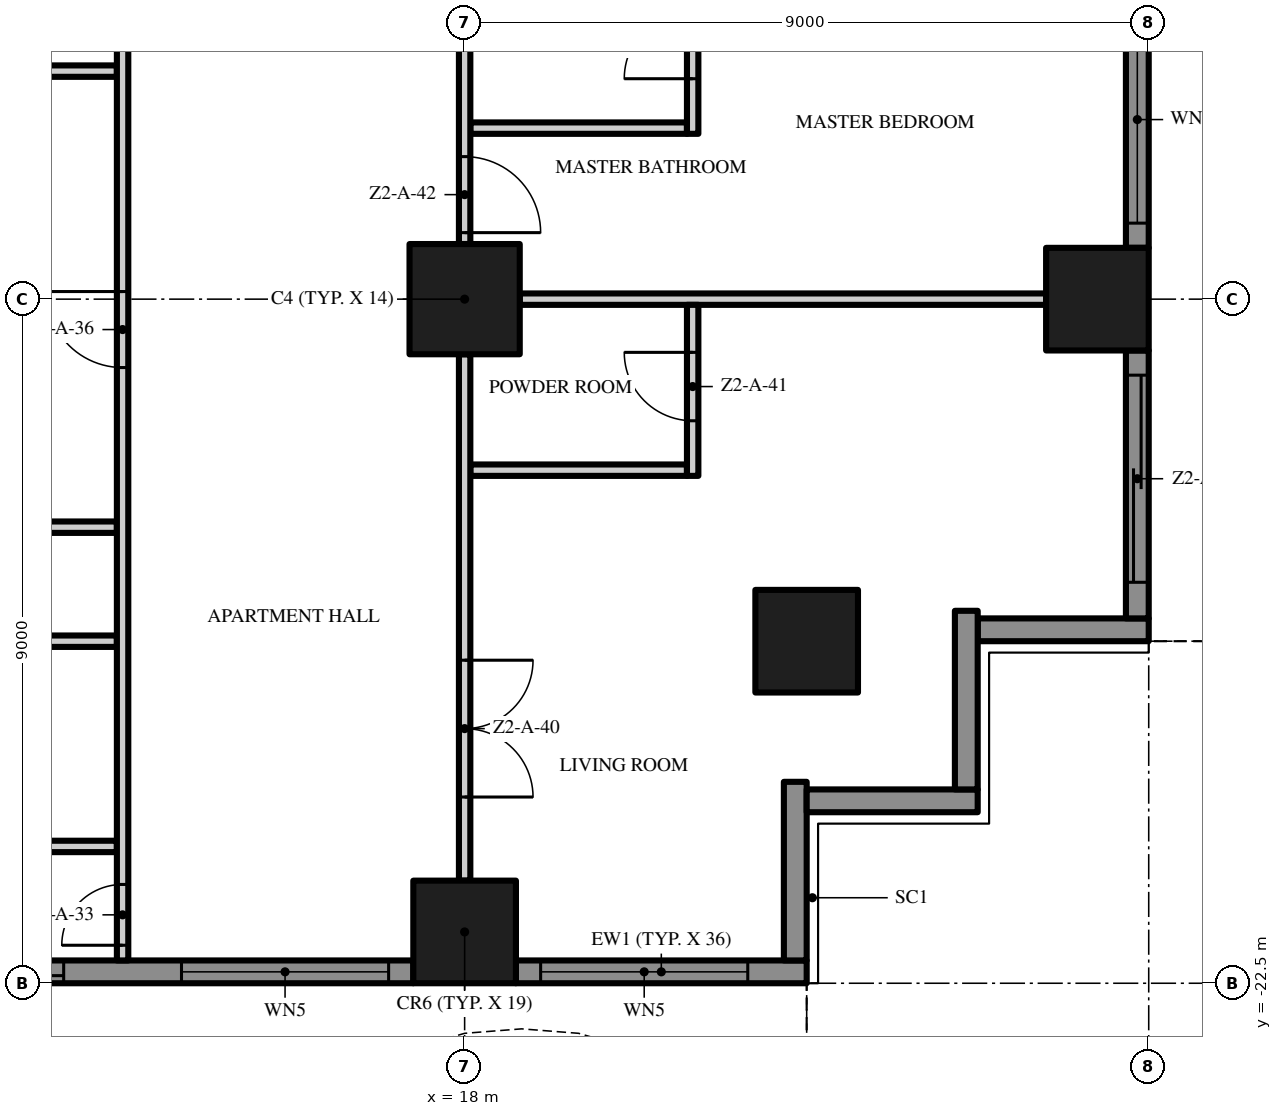
"""IFC4 building model, lengths in metres.
Left out: names, types, materials, properties, quantities, classifications, styles, units other than length and angle.
Written with IfcOpenShell. Run it as: python <this file> out.ifc"""

import sys

from ifc_helpers import new_model, si_unit, direction, frame, frame_2d, origin, origin_2d, place, context, subcontext, project, spatial, polyline, rectangle, outline, extrude, element, fill, save


model = new_model("IFC4")
c1 = context("Model", 3, precision=1e-05, world=origin(), true_north=direction((0.0, 1.0)))
c2 = subcontext(c1, "Body", "Model", "MODEL_VIEW")
j1 = project(units=[si_unit("LENGTHUNIT", "METRE"), si_unit("PLANEANGLEUNIT", "RADIAN")], contexts=[c1])
p1 = place(None, origin())
s1 = spatial("IfcSite", under=j1, at=p1, CompositionType="ELEMENT")
p2 = place(p1, origin())
s2 = spatial("IfcBuilding", under=s1, at=p2, CompositionType="ELEMENT")
p3 = place(p2, frame((0.0, 0.0, 77.0)))
s3 = spatial("IfcBuildingStorey", under=s2, at=p3, CompositionType="ELEMENT", Elevation=77.0)
p4 = place(p3, frame((18.0, -13.5, 0.0), z_axis=(0.0, 0.0, 1.0), x_axis=(1.0, 0.0, 0.0)))
e1 = element("IfcColumn", 1, at=p4, inside=s3, PredefinedType="COLUMN", context=c2, shape_type="SweptSolid", body=[
    extrude(rectangle(XDim=1.45, YDim=1.45, at=origin_2d()), origin(), (0.0, 0.0, 1.0), 3.5),
])
for number, where, z_axis, x_axis in (
    (2, (18.0, -21.825, 0.0), (0.0, 0.0, 1.0), (1.0, 0.0, 0.0)),
    (3, (26.325, -13.5, 0.0), (0.0, 0.0, 1.0), (1.0, 0.0, 0.0)),
    (4, (22.5, -18.0, 0.0), (0.0, 0.0, 1.0), (1.0, 0.0, 0.0)),
):
    element("IfcColumn", number, at=place(p3, frame(where, z_axis=z_axis, x_axis=x_axis)), inside=s3, PredefinedType="COLUMN", context=c2, shape_type="SweptSolid", body=[
        extrude(rectangle(XDim=1.35, YDim=1.35, at=origin_2d()), origin(), (0.0, 0.0, 1.0), 3.5),
    ])
p5 = place(p3, frame((17.325, -22.35, 0.0), z_axis=(0.0, 0.0, 1.0), x_axis=(-1.0, 0.0, 0.0)))
e5 = element("IfcWall", 5, at=p5, inside=s3, PredefinedType="SOLIDWALL", context=c2, shape_type="SweptSolid", body=[
    extrude(rectangle(XDim=7.65, YDim=0.3, at=frame_2d((3.825, 0.0))), origin(), (0.0, 0.0, 1.0), 3.5),
])
p6 = place(p5, frame((4.6, 0.0, 0.0)))
e6 = element("IfcOpeningElement", 6, at=p6, cuts=e5, PredefinedType="OPENING", context=c2, shape_type="SweptSolid", body=[
    extrude(rectangle(XDim=2.725, YDim=2.4, at=frame_2d((1.363, 1.2))), frame((0.0, 0.16, 0.0), z_axis=(0.0, -1.0, 0.0), x_axis=(1.0, 0.0, 0.0)), (0.0, 0.0, 1.0), 0.32),
])
p7 = place(p5, frame((0.325, 0.0, 0.45)))
e7 = element("IfcOpeningElement", 7, at=p7, cuts=e5, PredefinedType="OPENING", context=c2, shape_type="SweptSolid", body=[
    extrude(rectangle(XDim=2.725, YDim=2.65, at=frame_2d((1.363, 1.325))), frame((0.0, 0.16, 0.0), z_axis=(0.0, -1.0, 0.0), x_axis=(1.0, 0.0, 0.0)), (0.0, 0.0, 1.0), 0.32),
])
p8 = place(p3, frame((22.5, -22.35, 0.0), z_axis=(0.0, 0.0, 1.0), x_axis=(-1.0, 0.0, 0.0)))
e8 = element("IfcWall", 8, at=p8, inside=s3, PredefinedType="SOLIDWALL", context=c2, shape_type="SweptSolid", body=[
    extrude(rectangle(XDim=3.825, YDim=0.3, at=frame_2d((1.913, 0.0))), origin(), (0.0, 0.0, 1.0), 3.5),
])
p9 = place(p8, frame((0.775, 0.0, 0.45)))
e9 = element("IfcOpeningElement", 9, at=p9, cuts=e8, PredefinedType="OPENING", context=c2, shape_type="SweptSolid", body=[
    extrude(rectangle(XDim=2.725, YDim=2.65, at=frame_2d((1.363, 1.325))), frame((0.0, 0.16, 0.0), z_axis=(0.0, -1.0, 0.0), x_axis=(1.0, 0.0, 0.0)), (0.0, 0.0, 1.0), 0.32),
])
p10 = place(p3, frame((22.35, -19.85, 0.0), z_axis=(0.0, 0.0, 1.0), x_axis=(0.0, -1.0, 0.0)))
e10 = element("IfcWall", 10, at=p10, inside=s3, PredefinedType="SOLIDWALL", context=c2, shape_type="SweptSolid", body=[
    extrude(rectangle(XDim=2.35, YDim=0.3, at=frame_2d((1.175, 0.0))), origin(), (0.0, 0.0, 1.0), 3.5),
])
p11 = place(p3, frame((24.75, -20.1, 0.0), z_axis=(0.0, 0.0, 1.0), x_axis=(-1.0, 0.0, 0.0)))
e11 = element("IfcWall", 11, at=p11, inside=s3, PredefinedType="SOLIDWALL", context=c2, shape_type="SweptSolid", body=[
    extrude(rectangle(XDim=2.25, YDim=0.3, at=frame_2d((1.125, 0.0))), origin(), (0.0, 0.0, 1.0), 3.5),
])
p12 = place(p3, frame((24.6, -17.6, 0.0), z_axis=(0.0, 0.0, 1.0), x_axis=(0.0, -1.0, 0.0)))
e12 = element("IfcWall", 12, at=p12, inside=s3, PredefinedType="SOLIDWALL", context=c2, shape_type="SweptSolid", body=[
    extrude(rectangle(XDim=2.35, YDim=0.3, at=frame_2d((1.175, 0.0))), origin(), (0.0, 0.0, 1.0), 3.5),
])
p13 = place(p3, frame((27.0, -17.85, 0.0), z_axis=(0.0, 0.0, 1.0), x_axis=(-1.0, 0.0, 0.0)))
e13 = element("IfcWall", 13, at=p13, inside=s3, PredefinedType="SOLIDWALL", context=c2, shape_type="SweptSolid", body=[
    extrude(rectangle(XDim=2.25, YDim=0.3, at=frame_2d((1.125, 0.0))), origin(), (0.0, 0.0, 1.0), 3.5),
])
p14 = place(p3, frame((26.85, -14.175, 0.0), z_axis=(0.0, 0.0, 1.0), x_axis=(0.0, -1.0, 0.0)))
e14 = element("IfcWall", 14, at=p14, inside=s3, PredefinedType="SOLIDWALL", context=c2, shape_type="SweptSolid", body=[
    extrude(rectangle(XDim=3.525, YDim=0.3, at=frame_2d((1.762, 0.0))), origin(), (0.0, 0.0, 1.0), 3.5),
])
p15 = place(p14, frame((0.325, 0.0, 0.0)))
e15 = element("IfcOpeningElement", 15, at=p15, cuts=e14, PredefinedType="OPENING", context=c2, shape_type="SweptSolid", body=[
    extrude(rectangle(XDim=2.725, YDim=2.4, at=frame_2d((1.363, 1.2))), frame((0.0, 0.16, 0.0), z_axis=(0.0, -1.0, 0.0), x_axis=(1.0, 0.0, 0.0)), (0.0, 0.0, 1.0), 0.32),
])
p16 = place(p3, frame((26.85, -5.175, 0.0), z_axis=(0.0, 0.0, 1.0), x_axis=(0.0, -1.0, 0.0)))
e16 = element("IfcWall", 16, at=p16, inside=s3, PredefinedType="SOLIDWALL", context=c2, shape_type="SweptSolid", body=[
    extrude(rectangle(XDim=7.65, YDim=0.3, at=frame_2d((3.825, 0.0))), origin(), (0.0, 0.0, 1.0), 3.5),
])
p17 = place(p16, frame((4.6, 0.0, 0.45)))
e17 = element("IfcOpeningElement", 17, at=p17, cuts=e16, PredefinedType="OPENING", context=c2, shape_type="SweptSolid", body=[
    extrude(rectangle(XDim=2.725, YDim=2.65, at=frame_2d((1.363, 1.325))), frame((0.0, 0.16, 0.0), z_axis=(0.0, -1.0, 0.0), x_axis=(1.0, 0.0, 0.0)), (0.0, 0.0, 1.0), 0.32),
])
p18 = place(p16, frame((0.325, 0.0, 0.45)))
e18 = element("IfcOpeningElement", 18, at=p18, cuts=e16, PredefinedType="OPENING", context=c2, shape_type="SweptSolid", body=[
    extrude(rectangle(XDim=2.725, YDim=2.65, at=frame_2d((1.363, 1.325))), frame((0.0, 0.16, 0.0), z_axis=(0.0, -1.0, 0.0), x_axis=(1.0, 0.0, 0.0)), (0.0, 0.0, 1.0), 0.32),
])
p19 = place(p3, origin())
e19 = element("IfcWall", 19, at=p19, inside=s3, PredefinedType="USERDEFINED", context=c2, shape_type="SweptSolid", body=[
    extrude(outline(polyline([(-22.5, -24.3), (-21.0, -25.005), (-19.5, -25.441), (-18.75, -25.5), (-18.0, -25.441), (-16.5, -25.005), (-15.0, -24.3), (-13.5, -23.595), (-12.0, -23.159), (-11.25, -23.1), (-10.5, -23.159), (-9.0, -23.595), (-7.5, -24.3), (-6.0, -25.005), (-4.5, -25.441), (-3.75, -25.5), (-3.0, -25.441), (-1.5, -25.005), (0.0, -24.3), (1.5, -23.595), (3.0, -23.159), (3.75, -23.1), (4.5, -23.159), (6.0, -23.595), (7.5, -24.3), (9.0, -25.005), (10.5, -25.441), (11.25, -25.5), (12.0, -25.441), (13.5, -25.005), (15.0, -24.3), (16.5, -23.595), (18.0, -23.159), (18.75, -23.1), (19.5, -23.159), (21.0, -23.595), (22.5, -24.3), (22.606, -24.074), (21.089, -23.36), (19.545, -22.911), (18.75, -22.849), (17.955, -22.911), (16.411, -23.36), (14.894, -24.074), (13.411, -24.771), (11.955, -25.194), (11.25, -25.249), (10.545, -25.194), (9.089, -24.771), (7.606, -24.074), (6.089, -23.36), (4.545, -22.911), (3.75, -22.849), (2.955, -22.911), (1.411, -23.36), (-0.106, -24.074), (-1.589, -24.771), (-3.045, -25.194), (-3.75, -25.249), (-4.455, -25.194), (-5.911, -24.771), (-7.394, -24.074), (-8.911, -23.36), (-10.455, -22.911), (-11.25, -22.849), (-12.045, -22.911), (-13.589, -23.36), (-15.106, -24.074), (-16.589, -24.771), (-18.045, -25.194), (-18.75, -25.249), (-19.455, -25.194), (-20.911, -24.771), (-22.394, -24.074), (-22.5, -24.3)])), origin(), (0.0, 0.0, 1.0), 0.9),
])
p20 = place(p3, origin())
e20 = element("IfcWall", 20, at=p20, inside=s3, PredefinedType="USERDEFINED", context=c2, shape_type="SweptSolid", body=[
    extrude(outline(polyline([(28.8, -18.0), (29.505, -16.5), (29.941, -15.0), (30.0, -14.25), (29.941, -13.5), (29.505, -12.0), (28.8, -10.5), (28.095, -9.0), (27.659, -7.5), (27.6, -6.75), (27.659, -6.0), (28.095, -4.5), (28.8, -3.0), (29.505, -1.5), (29.941, 0.0), (30.0, 0.75), (29.941, 1.5), (29.505, 3.0), (28.8, 4.5), (28.095, 6.0), (27.659, 7.5), (27.6, 8.25), (27.659, 9.0), (28.095, 10.5), (28.8, 12.0), (29.505, 13.5), (29.941, 15.0), (30.0, 15.75), (29.941, 16.5), (29.505, 18.0), (29.265, 17.93), (29.694, 16.455), (29.749, 15.75), (29.694, 15.045), (29.271, 13.589), (28.574, 12.106), (27.86, 10.589), (27.411, 9.045), (27.349, 8.25), (27.411, 7.455), (27.86, 5.911), (28.574, 4.394), (29.271, 2.911), (29.694, 1.455), (29.749, 0.75), (29.694, 0.045), (29.271, -1.411), (28.574, -2.894), (27.86, -4.411), (27.411, -5.955), (27.349, -6.75), (27.411, -7.545), (27.86, -9.089), (28.574, -10.606), (29.271, -12.089), (29.694, -13.545), (29.749, -14.25), (29.694, -14.955), (29.271, -16.411), (28.574, -17.894), (28.8, -18.0)])), origin(), (0.0, 0.0, 1.0), 0.9),
])
for number, where, z_axis, x_axis in (
    (21, (9.075, -20.7, 0.0), (0.0, 0.0, 1.0), (1.0, 0.0, 0.0)),
    (22, (9.075, -18.0, 0.0), (0.0, 0.0, 1.0), (1.0, 0.0, 0.0)),
    (23, (9.075, -16.5, 0.0), (0.0, 0.0, 1.0), (1.0, 0.0, 0.0)),
):
    element("IfcWall", number, at=place(p3, frame(where, z_axis=z_axis, x_axis=x_axis)), inside=s3, PredefinedType="PARTITIONING", context=c2, shape_type="SweptSolid", body=[
        extrude(rectangle(XDim=4.35, YDim=0.15, at=frame_2d((2.175, 0.0))), origin(), (0.0, 0.0, 1.0), 3.5),
    ])
p21 = place(p3, frame((18.075, -15.75, 0.0), z_axis=(0.0, 0.0, 1.0), x_axis=(1.0, 0.0, 0.0)))
e24 = element("IfcWall", 24, at=p21, inside=s3, PredefinedType="PARTITIONING", context=c2, shape_type="SweptSolid", body=[
    extrude(rectangle(XDim=2.85, YDim=0.15, at=frame_2d((1.425, 0.0))), origin(), (0.0, 0.0, 1.0), 3.5),
])
p22 = place(p3, frame((18.725, -13.5, 0.0), z_axis=(0.0, 0.0, 1.0), x_axis=(1.0, 0.0, 0.0)))
e25 = element("IfcWall", 25, at=p22, inside=s3, PredefinedType="PARTITIONING", context=c2, shape_type="SweptSolid", body=[
    extrude(rectangle(XDim=6.925, YDim=0.15, at=frame_2d((3.462, 0.0))), origin(), (0.0, 0.0, 1.0), 3.5),
])
p23 = place(p3, frame((18.075, -11.25, 0.0), z_axis=(0.0, 0.0, 1.0), x_axis=(1.0, 0.0, 0.0)))
e26 = element("IfcWall", 26, at=p23, inside=s3, PredefinedType="PARTITIONING", context=c2, shape_type="SweptSolid", body=[
    extrude(rectangle(XDim=2.85, YDim=0.15, at=frame_2d((1.425, 0.0))), origin(), (0.0, 0.0, 1.0), 3.5),
])
p24 = place(p3, frame((9.075, -10.5, 0.0), z_axis=(0.0, 0.0, 1.0), x_axis=(1.0, 0.0, 0.0)))
e27 = element("IfcWall", 27, at=p24, inside=s3, PredefinedType="PARTITIONING", context=c2, shape_type="SweptSolid", body=[
    extrude(rectangle(XDim=4.35, YDim=0.15, at=frame_2d((2.175, 0.0))), origin(), (0.0, 0.0, 1.0), 3.5),
])
p25 = place(p3, frame((13.5, -22.2, 0.0), z_axis=(0.0, 0.0, 1.0), x_axis=(0.0, 1.0, 0.0)))
e28 = element("IfcWall", 28, at=p25, inside=s3, PredefinedType="PARTITIONING", context=c2, shape_type="SweptSolid", body=[
    extrude(rectangle(XDim=14.025, YDim=0.15, at=frame_2d((7.013, 0.0))), origin(), (0.0, 0.0, 1.0), 3.5),
])
p26 = place(p25, frame((0.2, 0.0, 0.0)))
e29 = element("IfcOpeningElement", 29, at=p26, cuts=e28, PredefinedType="OPENING", context=c2, shape_type="SweptSolid", body=[
    extrude(rectangle(XDim=0.8, YDim=2.0, at=frame_2d((0.4, 1.0))), frame((0.0, 0.085, 0.0), z_axis=(0.0, -1.0, 0.0), x_axis=(1.0, 0.0, 0.0)), (0.0, 0.0, 1.0), 0.17),
])
p27 = place(p25, frame((7.8, 0.0, 0.0)))
e30 = element("IfcOpeningElement", 30, at=p27, cuts=e28, PredefinedType="OPENING", context=c2, shape_type="SweptSolid", body=[
    extrude(rectangle(XDim=1.0, YDim=2.4, at=frame_2d((0.5, 1.2))), frame((0.0, 0.085, 0.0), z_axis=(0.0, -1.0, 0.0), x_axis=(1.0, 0.0, 0.0)), (0.0, 0.0, 1.0), 0.17),
])
p28 = place(p3, frame((18.0, -14.225, 0.0), z_axis=(0.0, 0.0, 1.0), x_axis=(0.0, -1.0, 0.0)))
e31 = element("IfcWall", 31, at=p28, inside=s3, PredefinedType="PARTITIONING", context=c2, shape_type="SweptSolid", body=[
    extrude(rectangle(XDim=6.925, YDim=0.15, at=frame_2d((3.462, 0.0))), origin(), (0.0, 0.0, 1.0), 3.5),
])
p29 = place(p28, frame((4.025, 0.0, 0.0)))
e32 = element("IfcOpeningElement", 32, at=p29, cuts=e31, PredefinedType="OPENING", context=c2, shape_type="SweptSolid", body=[
    extrude(rectangle(XDim=1.8, YDim=2.4, at=frame_2d((0.9, 1.2))), frame((0.0, 0.085, 0.0), z_axis=(0.0, -1.0, 0.0), x_axis=(1.0, 0.0, 0.0)), (0.0, 0.0, 1.0), 0.17),
])
p30 = place(p3, frame((18.0, -5.225, 0.0), z_axis=(0.0, 0.0, 1.0), x_axis=(0.0, -1.0, 0.0)))
e33 = element("IfcWall", 33, at=p30, inside=s3, PredefinedType="PARTITIONING", context=c2, shape_type="SweptSolid", body=[
    extrude(rectangle(XDim=7.55, YDim=0.15, at=frame_2d((3.775, 0.0))), origin(), (0.0, 0.0, 1.0), 3.5),
])
p31 = place(p30, frame((6.4, 0.0, 0.0)))
e34 = element("IfcOpeningElement", 34, at=p31, cuts=e33, PredefinedType="OPENING", context=c2, shape_type="SweptSolid", body=[
    extrude(rectangle(XDim=1.0, YDim=2.4, at=frame_2d((0.5, 1.2))), frame((0.0, 0.085, 0.0), z_axis=(0.0, -1.0, 0.0), x_axis=(1.0, 0.0, 0.0)), (0.0, 0.0, 1.0), 0.17),
])
p32 = place(p30, frame((0.15, 0.0, 0.0)))
e35 = element("IfcOpeningElement", 35, at=p32, cuts=e33, PredefinedType="OPENING", context=c2, shape_type="SweptSolid", body=[
    extrude(rectangle(XDim=1.0, YDim=2.4, at=frame_2d((0.5, 1.2))), frame((0.0, 0.085, 0.0), z_axis=(0.0, -1.0, 0.0), x_axis=(1.0, 0.0, 0.0)), (0.0, 0.0, 1.0), 0.17),
])
p33 = place(p3, frame((21.0, -15.825, 0.0), z_axis=(0.0, 0.0, 1.0), x_axis=(0.0, 1.0, 0.0)))
e36 = element("IfcWall", 36, at=p33, inside=s3, PredefinedType="PARTITIONING", context=c2, shape_type="SweptSolid", body=[
    extrude(rectangle(XDim=2.25, YDim=0.15, at=frame_2d((1.125, 0.0))), origin(), (0.0, 0.0, 1.0), 3.5),
])
p34 = place(p33, frame((0.725, 0.0, 0.0)))
e37 = element("IfcOpeningElement", 37, at=p34, cuts=e36, PredefinedType="OPENING", context=c2, shape_type="SweptSolid", body=[
    extrude(rectangle(XDim=0.9, YDim=2.1, at=frame_2d((0.45, 1.05))), frame((0.0, 0.085, 0.0), z_axis=(0.0, -1.0, 0.0), x_axis=(1.0, 0.0, 0.0)), (0.0, 0.0, 1.0), 0.17),
])
p35 = place(p3, frame((21.0, -11.325, 0.0), z_axis=(0.0, 0.0, 1.0), x_axis=(0.0, 1.0, 0.0)))
e38 = element("IfcWall", 38, at=p35, inside=s3, PredefinedType="PARTITIONING", context=c2, shape_type="SweptSolid", body=[
    extrude(rectangle(XDim=4.65, YDim=0.15, at=frame_2d((2.325, 0.0))), origin(), (0.0, 0.0, 1.0), 3.5),
])
p36 = place(p35, frame((0.725, 0.0, 0.0)))
e39 = element("IfcOpeningElement", 39, at=p36, cuts=e38, PredefinedType="OPENING", context=c2, shape_type="SweptSolid", body=[
    extrude(rectangle(XDim=0.9, YDim=2.1, at=frame_2d((0.45, 1.05))), frame((0.0, 0.085, 0.0), z_axis=(0.0, -1.0, 0.0), x_axis=(1.0, 0.0, 0.0)), (0.0, 0.0, 1.0), 0.17),
])
p37 = place(p35, frame((3.025, 0.0, 0.0)))
e40 = element("IfcOpeningElement", 40, at=p37, cuts=e38, PredefinedType="OPENING", context=c2, shape_type="SweptSolid", body=[
    extrude(rectangle(XDim=0.9, YDim=2.1, at=frame_2d((0.45, 1.05))), frame((0.0, 0.085, 0.0), z_axis=(0.0, -1.0, 0.0), x_axis=(1.0, 0.0, 0.0)), (0.0, 0.0, 1.0), 0.17),
])
p38 = place(p6, origin())
e41 = element("IfcDoor", 41, at=p38, inside=s3, OperationType="SINGLE_SWING_LEFT", PredefinedType="DOOR", context=c2, shape_type="SweptSolid", body=[
    extrude(rectangle(XDim=2.725, YDim=2.4, at=frame_2d((1.363, 1.2))), frame((0.0, 0.025, 0.0), z_axis=(0.0, -1.0, 0.0), x_axis=(1.0, 0.0, 0.0)), (0.0, 0.0, 1.0), 0.05),
])
fill(e6, e41)
p39 = place(p7, origin())
e42 = element("IfcWindow", 42, at=p39, inside=s3, PartitioningType="SINGLE_PANEL", PredefinedType="WINDOW", context=c2, shape_type="SweptSolid", body=[
    extrude(rectangle(XDim=2.725, YDim=2.65, at=frame_2d((1.363, 1.325))), frame((0.0, 0.03, 0.0), z_axis=(0.0, -1.0, 0.0), x_axis=(1.0, 0.0, 0.0)), (0.0, 0.0, 1.0), 0.06),
])
fill(e7, e42)
p40 = place(p9, origin())
e43 = element("IfcWindow", 43, at=p40, inside=s3, PartitioningType="SINGLE_PANEL", PredefinedType="WINDOW", context=c2, shape_type="SweptSolid", body=[
    extrude(rectangle(XDim=2.725, YDim=2.65, at=frame_2d((1.363, 1.325))), frame((0.0, 0.03, 0.0), z_axis=(0.0, -1.0, 0.0), x_axis=(1.0, 0.0, 0.0)), (0.0, 0.0, 1.0), 0.06),
])
fill(e9, e43)
p41 = place(p15, origin())
e44 = element("IfcDoor", 44, at=p41, inside=s3, OperationType="SINGLE_SWING_LEFT", PredefinedType="DOOR", context=c2, shape_type="SweptSolid", body=[
    extrude(rectangle(XDim=2.725, YDim=2.4, at=frame_2d((1.363, 1.2))), frame((0.0, 0.025, 0.0), z_axis=(0.0, -1.0, 0.0), x_axis=(1.0, 0.0, 0.0)), (0.0, 0.0, 1.0), 0.05),
])
fill(e15, e44)
p42 = place(p17, origin())
e45 = element("IfcWindow", 45, at=p42, inside=s3, PartitioningType="SINGLE_PANEL", PredefinedType="WINDOW", context=c2, shape_type="SweptSolid", body=[
    extrude(rectangle(XDim=2.725, YDim=2.65, at=frame_2d((1.363, 1.325))), frame((0.0, 0.03, 0.0), z_axis=(0.0, -1.0, 0.0), x_axis=(1.0, 0.0, 0.0)), (0.0, 0.0, 1.0), 0.06),
])
fill(e17, e45)
p43 = place(p26, origin())
e46 = element("IfcDoor", 46, at=p43, inside=s3, OperationType="SINGLE_SWING_LEFT", PredefinedType="DOOR", context=c2, shape_type="SweptSolid", body=[
    extrude(rectangle(XDim=0.8, YDim=2.0, at=frame_2d((0.4, 1.0))), frame((0.0, 0.025, 0.0), z_axis=(0.0, -1.0, 0.0), x_axis=(1.0, 0.0, 0.0)), (0.0, 0.0, 1.0), 0.05),
])
fill(e29, e46)
p44 = place(p27, origin())
e47 = element("IfcDoor", 47, at=p44, inside=s3, OperationType="SINGLE_SWING_RIGHT", PredefinedType="DOOR", context=c2, shape_type="SweptSolid", body=[
    extrude(rectangle(XDim=1.0, YDim=2.4, at=frame_2d((0.5, 1.2))), frame((0.0, 0.025, 0.0), z_axis=(0.0, -1.0, 0.0), x_axis=(1.0, 0.0, 0.0)), (0.0, 0.0, 1.0), 0.05),
])
fill(e30, e47)
p45 = place(p29, origin())
e48 = element("IfcDoor", 48, at=p45, inside=s3, OperationType="DOUBLE_DOOR_SINGLE_SWING", PredefinedType="DOOR", context=c2, shape_type="SweptSolid", body=[
    extrude(rectangle(XDim=1.8, YDim=2.4, at=frame_2d((0.9, 1.2))), frame((0.0, 0.025, 0.0), z_axis=(0.0, -1.0, 0.0), x_axis=(1.0, 0.0, 0.0)), (0.0, 0.0, 1.0), 0.05),
])
fill(e32, e48)
p46 = place(p34, origin())
e49 = element("IfcDoor", 49, at=p46, inside=s3, OperationType="SINGLE_SWING_RIGHT", PredefinedType="DOOR", context=c2, shape_type="SweptSolid", body=[
    extrude(rectangle(XDim=0.9, YDim=2.1, at=frame_2d((0.45, 1.05))), frame((0.0, 0.025, 0.0), z_axis=(0.0, -1.0, 0.0), x_axis=(1.0, 0.0, 0.0)), (0.0, 0.0, 1.0), 0.05),
])
fill(e37, e49)
p47 = place(p31, origin())
e50 = element("IfcDoor", 50, at=p47, inside=s3, OperationType="SINGLE_SWING_RIGHT", PredefinedType="DOOR", context=c2, shape_type="SweptSolid", body=[
    extrude(rectangle(XDim=1.0, YDim=2.4, at=frame_2d((0.5, 1.2))), frame((0.0, 0.025, 0.0), z_axis=(0.0, -1.0, 0.0), x_axis=(1.0, 0.0, 0.0)), (0.0, 0.0, 1.0), 0.05),
])
fill(e34, e50)
p48 = place(p36, origin())
e51 = element("IfcDoor", 51, at=p48, inside=s3, OperationType="SINGLE_SWING_LEFT", PredefinedType="DOOR", context=c2, shape_type="SweptSolid", body=[
    extrude(rectangle(XDim=0.9, YDim=2.1, at=frame_2d((0.45, 1.05))), frame((0.0, 0.025, 0.0), z_axis=(0.0, -1.0, 0.0), x_axis=(1.0, 0.0, 0.0)), (0.0, 0.0, 1.0), 0.05),
])
fill(e39, e51)
save(model, sys.argv[1])
